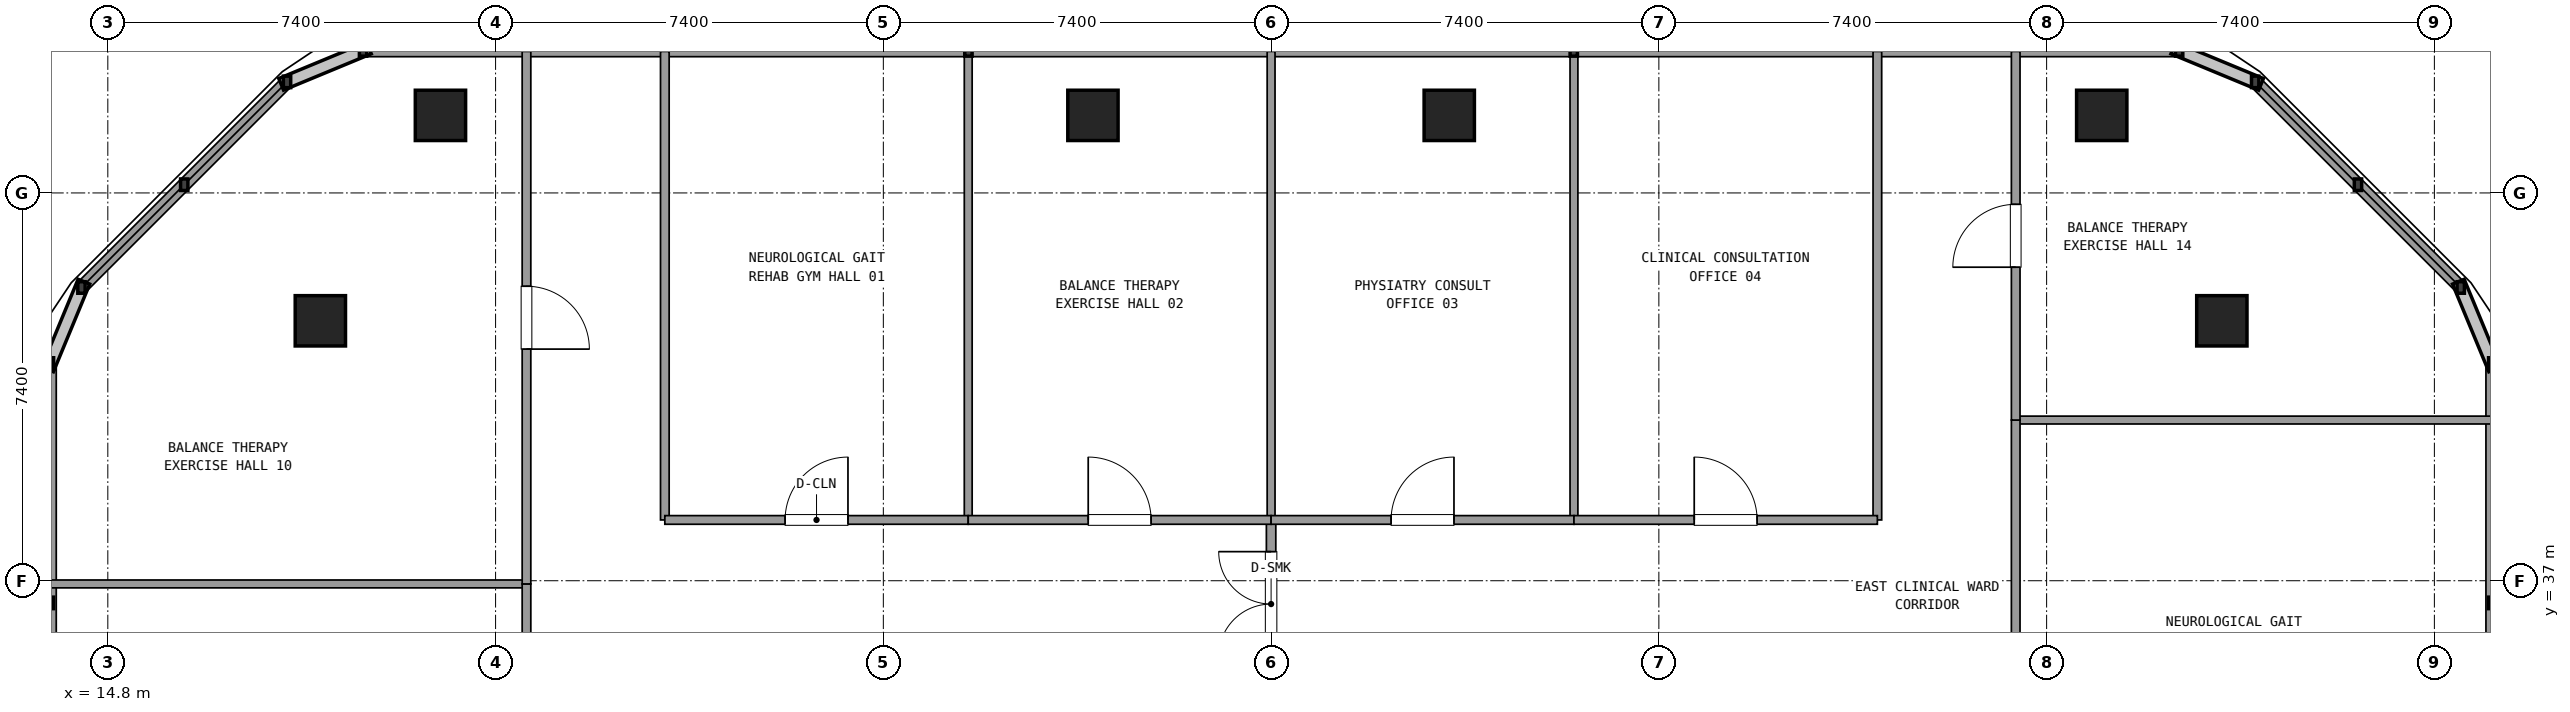
"""IFC4 building model, lengths in metres.
Left out: names, types, materials, properties, quantities, classifications, styles, units other than length and angle.
Written with IfcOpenShell. Run it as: python <this file> out.ifc"""

import sys

from ifc_helpers import new_model, si_unit, direction, frame, frame_2d, origin, origin_2d, place, context, subcontext, project, spatial, rectangle, extrude, element, fill, save


model = new_model("IFC4")
c1 = context("Model", 3, precision=1e-05, world=origin(), true_north=direction((0.0, 1.0)))
c2 = subcontext(c1, "Body", "Model", "MODEL_VIEW")
j1 = project(units=[si_unit("LENGTHUNIT", "METRE"), si_unit("PLANEANGLEUNIT", "RADIAN")], contexts=[c1])
p1 = place(None, origin())
s1 = spatial("IfcSite", under=j1, at=p1, CompositionType="ELEMENT")
p2 = place(p1, origin())
s2 = spatial("IfcBuilding", under=s1, at=p2, CompositionType="ELEMENT")
p3 = place(p2, frame((0.0, 0.0, 170.82)))
s3 = spatial("IfcBuildingStorey", under=s2, at=p3, CompositionType="ELEMENT", Elevation=170.82)
for number, where, z_axis, x_axis in (
    (1, (55.144, 41.96, 0.0), (0.0, 0.0, 1.0), (1.0, 0.0, 0.0)),
    (2, (52.852, 45.88, 0.0), (0.0, 0.0, 1.0), (1.0, 0.0, 0.0)),
    (3, (40.4, 45.88, 0.0), (0.0, 0.0, 1.0), (1.0, 0.0, 0.0)),
    (4, (33.6, 45.88, 0.0), (0.0, 0.0, 1.0), (1.0, 0.0, 0.0)),
    (5, (21.148, 45.88, 0.0), (0.0, 0.0, 1.0), (1.0, 0.0, 0.0)),
    (6, (18.856, 41.96, 0.0), (0.0, 0.0, 1.0), (1.0, 0.0, 0.0)),
):
    element("IfcColumn", number, at=place(p3, frame(where, z_axis=z_axis, x_axis=x_axis)), inside=s3, PredefinedType="COLUMN", context=c2, shape_type="SweptSolid", body=[
        extrude(rectangle(XDim=0.96, YDim=0.96, at=origin_2d()), origin(), (0.0, 0.0, 1.0), 3.6),
    ])
p4 = place(p3, frame((60.304, 27.44, 0.0), z_axis=(0.0, 0.0, 1.0), x_axis=(0.0, 1.0, 0.0)))
e7 = element("IfcWall", 7, at=p4, inside=s3, PredefinedType="SOLIDWALL", context=c2, shape_type="SweptSolid", body=[
    extrude(rectangle(XDim=13.705, YDim=0.24, at=frame_2d((6.853, 0.0))), origin(), (0.0, 0.0, 1.0), 0.85),
])
p5 = place(p3, frame((59.703, 42.596, 0.0), z_axis=(0.0, 0.0, 1.0), x_axis=(-0.707084777957, 0.707128783731, 0.0)))
e8 = element("IfcWall", 8, at=p5, inside=s3, PredefinedType="SOLIDWALL", context=c2, shape_type="SweptSolid", body=[
    extrude(rectangle(XDim=5.548, YDim=0.24, at=frame_2d((2.774, 0.0))), origin(), (0.0, 0.0, 1.0), 0.85),
])
p6 = place(p3, frame((54.329, 47.12, 0.0), z_axis=(0.0, 0.0, 1.0), x_axis=(-1.0, 0.0, 0.0)))
e9 = element("IfcWall", 9, at=p6, inside=s3, PredefinedType="SOLIDWALL", context=c2, shape_type="SweptSolid", body=[
    extrude(rectangle(XDim=34.658, YDim=0.24, at=frame_2d((17.329, 0.0))), origin(), (0.0, 0.0, 1.0), 0.85),
])
p7 = place(p3, frame((18.22, 46.519, 0.0), z_axis=(0.0, 0.0, 1.0), x_axis=(-0.707084777957, -0.707128783731, 0.0)))
e10 = element("IfcWall", 10, at=p7, inside=s3, PredefinedType="SOLIDWALL", context=c2, shape_type="SweptSolid", body=[
    extrude(rectangle(XDim=5.548, YDim=0.24, at=frame_2d((2.774, 0.0))), origin(), (0.0, 0.0, 1.0), 0.85),
])
p8 = place(p3, frame((13.696, 41.145, 0.0), z_axis=(0.0, 0.0, 1.0), x_axis=(0.0, -1.0, 0.0)))
e11 = element("IfcWall", 11, at=p8, inside=s3, PredefinedType="SOLIDWALL", context=c2, shape_type="SweptSolid", body=[
    extrude(rectangle(XDim=13.705, YDim=0.24, at=frame_2d((6.853, 0.0))), origin(), (0.0, 0.0, 1.0), 0.85),
])
p9 = place(p3, frame((37.0, 34.95, 0.0), z_axis=(0.0, 0.0, 1.0), x_axis=(0.0, 1.0, 0.0)))
e12 = element("IfcWall", 12, at=p9, inside=s3, PredefinedType="PARTITIONING", context=c2, shape_type="SweptSolid", body=[
    extrude(rectangle(XDim=3.21, YDim=0.18, at=frame_2d((1.605, 0.0))), origin(), (0.0, 0.0, 1.0), 2.61),
])
p10 = place(p9, frame((0.605, 0.0, 0.0)))
e13 = element("IfcOpeningElement", 13, at=p10, cuts=e12, PredefinedType="OPENING", context=c2, shape_type="SweptSolid", body=[
    extrude(rectangle(XDim=2.0, YDim=2.2, at=frame_2d((1.0, 1.1))), frame((0.0, 0.1, 0.0), z_axis=(0.0, -1.0, 0.0), x_axis=(1.0, 0.0, 0.0)), (0.0, 0.0, 1.0), 0.2),
])
for number, where, z_axis, x_axis in (
    (14, (25.43, 38.16, 0.0), (0.0, 0.0, 1.0), (0.0, 1.0, 0.0)),
    (15, (48.57, 38.16, 0.0), (0.0, 0.0, 1.0), (0.0, 1.0, 0.0)),
):
    element("IfcWall", number, at=place(p3, frame(where, z_axis=z_axis, x_axis=x_axis)), inside=s3, PredefinedType="PARTITIONING", context=c2, shape_type="SweptSolid", body=[
        extrude(rectangle(XDim=8.94, YDim=0.165, at=frame_2d((4.47, 0.0))), origin(), (0.0, 0.0, 1.0), 2.61),
    ])
p11 = place(p3, frame((31.22, 38.16, 0.0), z_axis=(0.0, 0.0, 1.0), x_axis=(0.0, 1.0, 0.0)))
e16 = element("IfcWall", 16, at=p11, inside=s3, PredefinedType="PARTITIONING", context=c2, shape_type="SweptSolid", body=[
    extrude(rectangle(XDim=8.94, YDim=0.15, at=frame_2d((4.47, 0.0))), origin(), (0.0, 0.0, 1.0), 2.61),
])
p12 = place(p3, frame((25.43, 38.16, 0.0), z_axis=(0.0, 0.0, 1.0), x_axis=(1.0, 0.0, 0.0)))
e17 = element("IfcWall", 17, at=p12, inside=s3, PredefinedType="PARTITIONING", context=c2, shape_type="SweptSolid", body=[
    extrude(rectangle(XDim=5.79, YDim=0.165, at=frame_2d((2.895, 0.0))), origin(), (0.0, 0.0, 1.0), 2.61),
])
p13 = place(p12, frame((2.295, 0.0, 0.0)))
e18 = element("IfcOpeningElement", 18, at=p13, cuts=e17, PredefinedType="OPENING", context=c2, shape_type="SweptSolid", body=[
    extrude(rectangle(XDim=1.2, YDim=2.15, at=frame_2d((0.6, 1.075))), frame((0.0, 0.093, 0.0), z_axis=(0.0, -1.0, 0.0), x_axis=(1.0, 0.0, 0.0)), (0.0, 0.0, 1.0), 0.185),
])
p14 = place(p3, frame((37.0, 38.16, 0.0), z_axis=(0.0, 0.0, 1.0), x_axis=(0.0, 1.0, 0.0)))
e19 = element("IfcWall", 19, at=p14, inside=s3, PredefinedType="PARTITIONING", context=c2, shape_type="SweptSolid", body=[
    extrude(rectangle(XDim=8.94, YDim=0.15, at=frame_2d((4.47, 0.0))), origin(), (0.0, 0.0, 1.0), 2.61),
])
p15 = place(p3, frame((31.22, 38.16, 0.0), z_axis=(0.0, 0.0, 1.0), x_axis=(1.0, 0.0, 0.0)))
e20 = element("IfcWall", 20, at=p15, inside=s3, PredefinedType="PARTITIONING", context=c2, shape_type="SweptSolid", body=[
    extrude(rectangle(XDim=5.78, YDim=0.165, at=frame_2d((2.89, 0.0))), origin(), (0.0, 0.0, 1.0), 2.61),
])
p16 = place(p15, frame((2.29, 0.0, 0.0)))
e21 = element("IfcOpeningElement", 21, at=p16, cuts=e20, PredefinedType="OPENING", context=c2, shape_type="SweptSolid", body=[
    extrude(rectangle(XDim=1.2, YDim=2.15, at=frame_2d((0.6, 1.075))), frame((0.0, 0.093, 0.0), z_axis=(0.0, -1.0, 0.0), x_axis=(1.0, 0.0, 0.0)), (0.0, 0.0, 1.0), 0.185),
])
p17 = place(p3, frame((42.78, 38.16, 0.0), z_axis=(0.0, 0.0, 1.0), x_axis=(0.0, 1.0, 0.0)))
e22 = element("IfcWall", 22, at=p17, inside=s3, PredefinedType="PARTITIONING", context=c2, shape_type="SweptSolid", body=[
    extrude(rectangle(XDim=8.94, YDim=0.15, at=frame_2d((4.47, 0.0))), origin(), (0.0, 0.0, 1.0), 2.61),
])
p18 = place(p3, frame((37.0, 38.16, 0.0), z_axis=(0.0, 0.0, 1.0), x_axis=(1.0, 0.0, 0.0)))
e23 = element("IfcWall", 23, at=p18, inside=s3, PredefinedType="PARTITIONING", context=c2, shape_type="SweptSolid", body=[
    extrude(rectangle(XDim=5.78, YDim=0.165, at=frame_2d((2.89, 0.0))), origin(), (0.0, 0.0, 1.0), 2.61),
])
p19 = place(p18, frame((2.29, 0.0, 0.0)))
e24 = element("IfcOpeningElement", 24, at=p19, cuts=e23, PredefinedType="OPENING", context=c2, shape_type="SweptSolid", body=[
    extrude(rectangle(XDim=1.2, YDim=2.15, at=frame_2d((0.6, 1.075))), frame((0.0, 0.093, 0.0), z_axis=(0.0, -1.0, 0.0), x_axis=(1.0, 0.0, 0.0)), (0.0, 0.0, 1.0), 0.185),
])
p20 = place(p3, frame((42.78, 38.16, 0.0), z_axis=(0.0, 0.0, 1.0), x_axis=(1.0, 0.0, 0.0)))
e25 = element("IfcWall", 25, at=p20, inside=s3, PredefinedType="PARTITIONING", context=c2, shape_type="SweptSolid", body=[
    extrude(rectangle(XDim=5.79, YDim=0.165, at=frame_2d((2.895, 0.0))), origin(), (0.0, 0.0, 1.0), 2.61),
])
p21 = place(p20, frame((2.295, 0.0, 0.0)))
e26 = element("IfcOpeningElement", 26, at=p21, cuts=e25, PredefinedType="OPENING", context=c2, shape_type="SweptSolid", body=[
    extrude(rectangle(XDim=1.2, YDim=2.15, at=frame_2d((0.6, 1.075))), frame((0.0, 0.093, 0.0), z_axis=(0.0, -1.0, 0.0), x_axis=(1.0, 0.0, 0.0)), (0.0, 0.0, 1.0), 0.185),
])
p22 = place(p3, frame((22.79, 36.939, 0.0), z_axis=(0.0, 0.0, 1.0), x_axis=(-1.0, 0.0, 0.0)))
e27 = element("IfcWall", 27, at=p22, inside=s3, PredefinedType="PARTITIONING", context=c2, shape_type="SweptSolid", body=[
    extrude(rectangle(XDim=9.074, YDim=0.15, at=frame_2d((4.537, 0.0))), origin(), (0.0, 0.0, 1.0), 2.61),
])
p23 = place(p3, frame((22.79, 27.56, 0.0), z_axis=(0.0, 0.0, 1.0), x_axis=(0.0, 1.0, 0.0)))
e28 = element("IfcWall", 28, at=p23, inside=s3, PredefinedType="PARTITIONING", context=c2, shape_type="SweptSolid", body=[
    extrude(rectangle(XDim=9.379, YDim=0.165, at=frame_2d((4.689, 0.0))), origin(), (0.0, 0.0, 1.0), 2.61),
])
p24 = place(p23, frame((4.09, 0.0, 0.0)))
e29 = element("IfcOpeningElement", 29, at=p24, cuts=e28, PredefinedType="OPENING", context=c2, shape_type="SweptSolid", body=[
    extrude(rectangle(XDim=1.2, YDim=2.15, at=frame_2d((0.6, 1.075))), frame((0.0, 0.093, 0.0), z_axis=(0.0, -1.0, 0.0), x_axis=(1.0, 0.0, 0.0)), (0.0, 0.0, 1.0), 0.185),
])
p25 = place(p3, frame((22.79, 36.939, 0.0), z_axis=(0.0, 0.0, 1.0), x_axis=(0.0, 1.0, 0.0)))
e30 = element("IfcWall", 30, at=p25, inside=s3, PredefinedType="PARTITIONING", context=c2, shape_type="SweptSolid", body=[
    extrude(rectangle(XDim=10.161, YDim=0.165, at=frame_2d((5.081, 0.0))), origin(), (0.0, 0.0, 1.0), 2.61),
])
p26 = place(p25, frame((4.481, 0.0, 0.0)))
e31 = element("IfcOpeningElement", 31, at=p26, cuts=e30, PredefinedType="OPENING", context=c2, shape_type="SweptSolid", body=[
    extrude(rectangle(XDim=1.2, YDim=2.15, at=frame_2d((0.6, 1.075))), frame((0.0, 0.093, 0.0), z_axis=(0.0, -1.0, 0.0), x_axis=(1.0, 0.0, 0.0)), (0.0, 0.0, 1.0), 0.185),
])
p27 = place(p3, frame((51.21, 40.066, 0.0), z_axis=(0.0, 0.0, 1.0), x_axis=(1.0, 0.0, 0.0)))
e32 = element("IfcWall", 32, at=p27, inside=s3, PredefinedType="PARTITIONING", context=c2, shape_type="SweptSolid", body=[
    extrude(rectangle(XDim=9.074, YDim=0.15, at=frame_2d((4.537, 0.0))), origin(), (0.0, 0.0, 1.0), 2.61),
])
p28 = place(p3, frame((51.21, 27.56, 0.0), z_axis=(0.0, 0.0, 1.0), x_axis=(0.0, 1.0, 0.0)))
e33 = element("IfcWall", 33, at=p28, inside=s3, PredefinedType="PARTITIONING", context=c2, shape_type="SweptSolid", body=[
    extrude(rectangle(XDim=12.506, YDim=0.165, at=frame_2d((6.253, 0.0))), origin(), (0.0, 0.0, 1.0), 2.61),
])
p29 = place(p28, frame((5.653, 0.0, 0.0)))
e34 = element("IfcOpeningElement", 34, at=p29, cuts=e33, PredefinedType="OPENING", context=c2, shape_type="SweptSolid", body=[
    extrude(rectangle(XDim=1.2, YDim=2.15, at=frame_2d((0.6, 1.075))), frame((0.0, 0.093, 0.0), z_axis=(0.0, -1.0, 0.0), x_axis=(1.0, 0.0, 0.0)), (0.0, 0.0, 1.0), 0.185),
])
p30 = place(p3, frame((51.21, 40.066, 0.0), z_axis=(0.0, 0.0, 1.0), x_axis=(0.0, 1.0, 0.0)))
e35 = element("IfcWall", 35, at=p30, inside=s3, PredefinedType="PARTITIONING", context=c2, shape_type="SweptSolid", body=[
    extrude(rectangle(XDim=7.034, YDim=0.165, at=frame_2d((3.517, 0.0))), origin(), (0.0, 0.0, 1.0), 2.61),
])
p31 = place(p30, frame((2.917, 0.0, 0.0)))
e36 = element("IfcOpeningElement", 36, at=p31, cuts=e35, PredefinedType="OPENING", context=c2, shape_type="SweptSolid", body=[
    extrude(rectangle(XDim=1.2, YDim=2.15, at=frame_2d((0.6, 1.075))), frame((0.0, 0.093, 0.0), z_axis=(0.0, -1.0, 0.0), x_axis=(1.0, 0.0, 0.0)), (0.0, 0.0, 1.0), 0.185),
])
p32 = place(p10, origin())
e37 = element("IfcDoor", 37, at=p32, inside=s3, OperationType="DOUBLE_DOOR_SINGLE_SWING", PredefinedType="DOOR", context=c2, shape_type="SweptSolid", body=[
    extrude(rectangle(XDim=2.0, YDim=2.2, at=frame_2d((1.0, 1.1))), frame((0.0, 0.025, 0.0), z_axis=(0.0, -1.0, 0.0), x_axis=(1.0, 0.0, 0.0)), (0.0, 0.0, 1.0), 0.05),
])
fill(e13, e37)
p33 = place(p13, origin())
e38 = element("IfcDoor", 38, at=p33, inside=s3, OperationType="SINGLE_SWING_RIGHT", PredefinedType="DOOR", context=c2, shape_type="SweptSolid", body=[
    extrude(rectangle(XDim=1.2, YDim=2.15, at=frame_2d((0.6, 1.075))), frame((0.0, 0.025, 0.0), z_axis=(0.0, -1.0, 0.0), x_axis=(1.0, 0.0, 0.0)), (0.0, 0.0, 1.0), 0.05),
])
fill(e18, e38)
p34 = place(p16, origin())
e39 = element("IfcDoor", 39, at=p34, inside=s3, OperationType="SINGLE_SWING_LEFT", PredefinedType="DOOR", context=c2, shape_type="SweptSolid", body=[
    extrude(rectangle(XDim=1.2, YDim=2.15, at=frame_2d((0.6, 1.075))), frame((0.0, 0.025, 0.0), z_axis=(0.0, -1.0, 0.0), x_axis=(1.0, 0.0, 0.0)), (0.0, 0.0, 1.0), 0.05),
])
fill(e21, e39)
p35 = place(p19, origin())
e40 = element("IfcDoor", 40, at=p35, inside=s3, OperationType="SINGLE_SWING_RIGHT", PredefinedType="DOOR", context=c2, shape_type="SweptSolid", body=[
    extrude(rectangle(XDim=1.2, YDim=2.15, at=frame_2d((0.6, 1.075))), frame((0.0, 0.025, 0.0), z_axis=(0.0, -1.0, 0.0), x_axis=(1.0, 0.0, 0.0)), (0.0, 0.0, 1.0), 0.05),
])
fill(e24, e40)
p36 = place(p21, origin())
e41 = element("IfcDoor", 41, at=p36, inside=s3, OperationType="SINGLE_SWING_LEFT", PredefinedType="DOOR", context=c2, shape_type="SweptSolid", body=[
    extrude(rectangle(XDim=1.2, YDim=2.15, at=frame_2d((0.6, 1.075))), frame((0.0, 0.025, 0.0), z_axis=(0.0, -1.0, 0.0), x_axis=(1.0, 0.0, 0.0)), (0.0, 0.0, 1.0), 0.05),
])
fill(e26, e41)
p37 = place(p26, frame((1.2, 0.0, 0.0), z_axis=(0.0, 0.0, 1.0), x_axis=(-1.0, 0.0, 0.0)))
e42 = element("IfcDoor", 42, at=p37, inside=s3, OperationType="SINGLE_SWING_LEFT", PredefinedType="DOOR", context=c2, shape_type="SweptSolid", body=[
    extrude(rectangle(XDim=1.2, YDim=2.15, at=frame_2d((0.6, 1.075))), frame((0.0, 0.025, 0.0), z_axis=(0.0, -1.0, 0.0), x_axis=(1.0, 0.0, 0.0)), (0.0, 0.0, 1.0), 0.05),
])
fill(e31, e42)
p38 = place(p31, origin())
e43 = element("IfcDoor", 43, at=p38, inside=s3, OperationType="SINGLE_SWING_LEFT", PredefinedType="DOOR", context=c2, shape_type="SweptSolid", body=[
    extrude(rectangle(XDim=1.2, YDim=2.15, at=frame_2d((0.6, 1.075))), frame((0.0, 0.025, 0.0), z_axis=(0.0, -1.0, 0.0), x_axis=(1.0, 0.0, 0.0)), (0.0, 0.0, 1.0), 0.05),
])
fill(e36, e43)
save(model, sys.argv[1])
